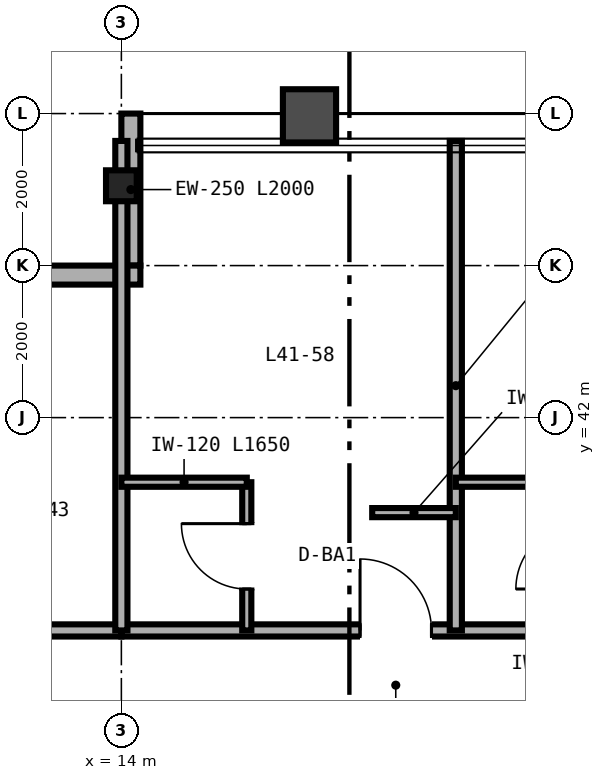
"""IFC4 building model, lengths in metres.
Left out: names, types, materials, properties, quantities, classifications, styles, units other than length and angle.
Written with IfcOpenShell. Run it as: python <this file> out.ifc"""

import sys

from ifc_helpers import new_model, si_unit, direction, frame, frame_2d, origin, origin_2d, place, context, subcontext, project, spatial, rectangle, i_section, extrude, source, transform, mapped, element, fill, save


model = new_model("IFC4")
c1 = context("Model", 3, precision=1e-05, world=origin(), true_north=direction((0.0, 1.0)))
c2 = subcontext(c1, "Body", "Model", "MODEL_VIEW")
j1 = project(units=[si_unit("LENGTHUNIT", "METRE"), si_unit("PLANEANGLEUNIT", "RADIAN")], contexts=[c1])
p1 = place(None, origin())
s1 = spatial("IfcSite", under=j1, at=p1, CompositionType="ELEMENT")
p2 = place(p1, origin())
s2 = spatial("IfcBuilding", under=s1, at=p2, CompositionType="ELEMENT")
p3 = place(p2, frame((0.0, 0.0, 166.8)))
s3 = spatial("IfcBuildingStorey", under=s2, at=p3, CompositionType="ELEMENT", Elevation=166.8)
m1 = source(origin(), c2, "Body", "SweptSolid", [
    extrude(i_section(OverallWidth=0.404, OverallDepth=0.407, WebThickness=0.027, FlangeThickness=0.044, FilletRadius=0.025, at=origin_2d()), origin(), (0.0, 0.0, 1.0), 3.37),
])
p4 = place(p3, frame((14.0, 45.05, 0.0), z_axis=(0.0, 0.0, 1.0), x_axis=(1.0, 0.0, 0.0)))
e1 = element("IfcColumn", 1, at=p4, inside=s3, PredefinedType="COLUMN", context=c2, shape_type="MappedRepresentation", body=[
    mapped(m1, transform((0.0, 0.0, 0.0), scale=1.0)),
])
p5 = place(p3, frame((14.125, 46.0, 0.0), z_axis=(0.0, 0.0, 1.0), x_axis=(0.0, -1.0, 0.0)))
e2 = element("IfcWall", 2, at=p5, inside=s3, PredefinedType="SOLIDWALL", context=c2, shape_type="SweptSolid", body=[
    extrude(rectangle(XDim=2.0, YDim=0.25, at=frame_2d((1.0, 0.0))), origin(), (0.0, 0.0, 1.0), 2.677),
])
p6 = place(p3, frame((14.25, 43.875, 0.0), z_axis=(0.0, 0.0, 1.0), x_axis=(-1.0, 0.0, 0.0)))
e3 = element("IfcWall", 3, at=p6, inside=s3, PredefinedType="SOLIDWALL", context=c2, shape_type="SweptSolid", body=[
    extrude(rectangle(XDim=2.0, YDim=0.25, at=frame_2d((1.0, 0.0))), origin(), (0.0, 0.0, 1.0), 3.37),
])
p7 = place(p3, frame((10.0, 39.2, 0.0), z_axis=(0.0, 0.0, 1.0), x_axis=(1.0, 0.0, 0.0)))
e4 = element("IfcWall", 4, at=p7, inside=s3, PredefinedType="PARTITIONING", context=c2, shape_type="SweptSolid", body=[
    extrude(rectangle(XDim=4.0, YDim=0.16, at=frame_2d((2.0, 0.0))), origin(), (0.0, 0.0, 1.0), 3.37),
])
p8 = place(p7, frame((1.52, 0.0, 0.0)))
e5 = element("IfcOpeningElement", 5, at=p8, cuts=e4, PredefinedType="OPENING", context=c2, shape_type="SweptSolid", body=[
    extrude(rectangle(XDim=0.96, YDim=2.15, at=frame_2d((0.48, 1.075))), frame((0.0, 0.09, 0.0), z_axis=(0.0, -1.0, 0.0), x_axis=(1.0, 0.0, 0.0)), (0.0, 0.0, 1.0), 0.18),
])
p9 = place(p3, frame((14.0, 39.2, 0.0), z_axis=(0.0, 0.0, 1.0), x_axis=(1.0, 0.0, 0.0)))
e6 = element("IfcWall", 6, at=p9, inside=s3, PredefinedType="PARTITIONING", context=c2, shape_type="SweptSolid", body=[
    extrude(rectangle(XDim=36.0, YDim=0.16, at=frame_2d((18.0, 0.0))), origin(), (0.0, 0.0, 1.0), 2.913),
])
p10 = place(p9, frame((3.14, 0.0, 0.0)))
e7 = element("IfcOpeningElement", 7, at=p10, cuts=e6, PredefinedType="OPENING", context=c2, shape_type="SweptSolid", body=[
    extrude(rectangle(XDim=0.94, YDim=2.15, at=frame_2d((0.47, 1.075))), frame((0.0, 0.09, 0.0), z_axis=(0.0, -1.0, 0.0), x_axis=(1.0, 0.0, 0.0)), (0.0, 0.0, 1.0), 0.18),
])
p11 = place(p9, frame((7.54, 0.0, 0.0)))
e8 = element("IfcOpeningElement", 8, at=p11, cuts=e6, PredefinedType="OPENING", context=c2, shape_type="SweptSolid", body=[
    extrude(rectangle(XDim=0.94, YDim=2.15, at=frame_2d((0.47, 1.075))), frame((0.0, 0.09, 0.0), z_axis=(0.0, -1.0, 0.0), x_axis=(1.0, 0.0, 0.0)), (0.0, 0.0, 1.0), 0.18),
])
p12 = place(p9, frame((11.94, 0.0, 0.0)))
e9 = element("IfcOpeningElement", 9, at=p12, cuts=e6, PredefinedType="OPENING", context=c2, shape_type="SweptSolid", body=[
    extrude(rectangle(XDim=0.94, YDim=2.15, at=frame_2d((0.47, 1.075))), frame((0.0, 0.09, 0.0), z_axis=(0.0, -1.0, 0.0), x_axis=(1.0, 0.0, 0.0)), (0.0, 0.0, 1.0), 0.18),
])
p13 = place(p9, frame((16.34, 0.0, 0.0)))
e10 = element("IfcOpeningElement", 10, at=p13, cuts=e6, PredefinedType="OPENING", context=c2, shape_type="SweptSolid", body=[
    extrude(rectangle(XDim=0.94, YDim=2.15, at=frame_2d((0.47, 1.075))), frame((0.0, 0.09, 0.0), z_axis=(0.0, -1.0, 0.0), x_axis=(1.0, 0.0, 0.0)), (0.0, 0.0, 1.0), 0.18),
])
p14 = place(p9, frame((20.94, 0.0, 0.0)))
e11 = element("IfcOpeningElement", 11, at=p14, cuts=e6, PredefinedType="OPENING", context=c2, shape_type="SweptSolid", body=[
    extrude(rectangle(XDim=0.94, YDim=2.15, at=frame_2d((0.47, 1.075))), frame((0.0, 0.09, 0.0), z_axis=(0.0, -1.0, 0.0), x_axis=(1.0, 0.0, 0.0)), (0.0, 0.0, 1.0), 0.18),
])
p15 = place(p9, frame((25.74, 0.0, 0.0)))
e12 = element("IfcOpeningElement", 12, at=p15, cuts=e6, PredefinedType="OPENING", context=c2, shape_type="SweptSolid", body=[
    extrude(rectangle(XDim=0.94, YDim=2.15, at=frame_2d((0.47, 1.075))), frame((0.0, 0.09, 0.0), z_axis=(0.0, -1.0, 0.0), x_axis=(1.0, 0.0, 0.0)), (0.0, 0.0, 1.0), 0.18),
])
p16 = place(p9, frame((30.24, 0.0, 0.0)))
e13 = element("IfcOpeningElement", 13, at=p16, cuts=e6, PredefinedType="OPENING", context=c2, shape_type="SweptSolid", body=[
    extrude(rectangle(XDim=0.94, YDim=2.15, at=frame_2d((0.47, 1.075))), frame((0.0, 0.09, 0.0), z_axis=(0.0, -1.0, 0.0), x_axis=(1.0, 0.0, 0.0)), (0.0, 0.0, 1.0), 0.18),
])
p17 = place(p9, frame((34.74, 0.0, 0.0)))
e14 = element("IfcOpeningElement", 14, at=p17, cuts=e6, PredefinedType="OPENING", context=c2, shape_type="SweptSolid", body=[
    extrude(rectangle(XDim=0.94, YDim=2.15, at=frame_2d((0.47, 1.075))), frame((0.0, 0.09, 0.0), z_axis=(0.0, -1.0, 0.0), x_axis=(1.0, 0.0, 0.0)), (0.0, 0.0, 1.0), 0.18),
])
for number, where, z_axis, x_axis in (
    (15, (14.0, 39.2, 0.0), (0.0, 0.0, 1.0), (0.0, 1.0, 0.0)),
    (16, (18.4, 39.2, 0.0), (0.0, 0.0, 1.0), (0.0, 1.0, 0.0)),
):
    element("IfcWall", number, at=place(p3, frame(where, z_axis=z_axis, x_axis=x_axis)), inside=s3, PredefinedType="PARTITIONING", context=c2, shape_type="SweptSolid", body=[
        extrude(rectangle(XDim=6.44, YDim=0.16, at=frame_2d((3.22, 0.0))), origin(), (0.0, 0.0, 1.0), 2.677),
    ])
p18 = place(p3, frame((15.65, 39.2, 0.0), z_axis=(0.0, 0.0, 1.0), x_axis=(0.0, 1.0, 0.0)))
e17 = element("IfcWall", 17, at=p18, inside=s3, PredefinedType="PARTITIONING", context=c2, shape_type="SweptSolid", body=[
    extrude(rectangle(XDim=1.95, YDim=0.12, at=frame_2d((0.975, 0.0))), origin(), (0.0, 0.0, 1.0), 3.37),
])
p19 = place(p18, frame((0.545, 0.0, 0.0)))
e18 = element("IfcOpeningElement", 18, at=p19, cuts=e17, PredefinedType="OPENING", context=c2, shape_type="SweptSolid", body=[
    extrude(rectangle(XDim=0.86, YDim=2.1, at=frame_2d((0.43, 1.05))), frame((0.0, 0.07, 0.0), z_axis=(0.0, -1.0, 0.0), x_axis=(1.0, 0.0, 0.0)), (0.0, 0.0, 1.0), 0.14),
])
p20 = place(p3, frame((14.0, 41.15, 0.0), z_axis=(0.0, 0.0, 1.0), x_axis=(1.0, 0.0, 0.0)))
e19 = element("IfcWall", 19, at=p20, inside=s3, PredefinedType="PARTITIONING", context=c2, shape_type="SweptSolid", body=[
    extrude(rectangle(XDim=1.65, YDim=0.12, at=frame_2d((0.825, 0.0))), origin(), (0.0, 0.0, 1.0), 3.37),
])
p21 = place(p3, frame((17.3, 40.75, 0.0), z_axis=(0.0, 0.0, 1.0), x_axis=(1.0, 0.0, 0.0)))
e20 = element("IfcWall", 20, at=p21, inside=s3, PredefinedType="PARTITIONING", context=c2, shape_type="SweptSolid", body=[
    extrude(rectangle(XDim=1.1, YDim=0.12, at=frame_2d((0.55, 0.0))), origin(), (0.0, 0.0, 1.0), 3.37),
])
p22 = place(p3, frame((18.4, 41.15, 0.0), z_axis=(0.0, 0.0, 1.0), x_axis=(1.0, 0.0, 0.0)))
e21 = element("IfcWall", 21, at=p22, inside=s3, PredefinedType="PARTITIONING", context=c2, shape_type="SweptSolid", body=[
    extrude(rectangle(XDim=1.65, YDim=0.12, at=frame_2d((0.825, 0.0))), origin(), (0.0, 0.0, 1.0), 3.37),
])
m2 = source(origin(), c2, "Body", "SweptSolid", [
    extrude(rectangle(XDim=0.86, YDim=2.1, at=frame_2d((0.43, 1.05))), frame((0.0, 0.025, 0.0), z_axis=(0.0, -1.0, 0.0), x_axis=(1.0, 0.0, 0.0)), (0.0, 0.0, 1.0), 0.05),
])
p23 = place(p19, origin())
e22 = element("IfcDoor", 22, at=p23, inside=s3, OperationType="SINGLE_SWING_RIGHT", PredefinedType="DOOR", context=c2, shape_type="MappedRepresentation", body=[
    mapped(m2, transform((0.0, 0.0, 0.0), scale=1.0)),
])
fill(e18, e22)
m3 = source(origin(), c2, "Body", "SweptSolid", [
    extrude(rectangle(XDim=0.94, YDim=2.15, at=frame_2d((0.47, 1.075))), frame((0.0, 0.025, 0.0), z_axis=(0.0, -1.0, 0.0), x_axis=(1.0, 0.0, 0.0)), (0.0, 0.0, 1.0), 0.05),
])
p24 = place(p10, origin())
e23 = element("IfcDoor", 23, at=p24, inside=s3, OperationType="SINGLE_SWING_LEFT", PredefinedType="DOOR", context=c2, shape_type="MappedRepresentation", body=[
    mapped(m3, transform((0.0, 0.0, 0.0), scale=1.0)),
])
fill(e7, e23)
save(model, sys.argv[1])
